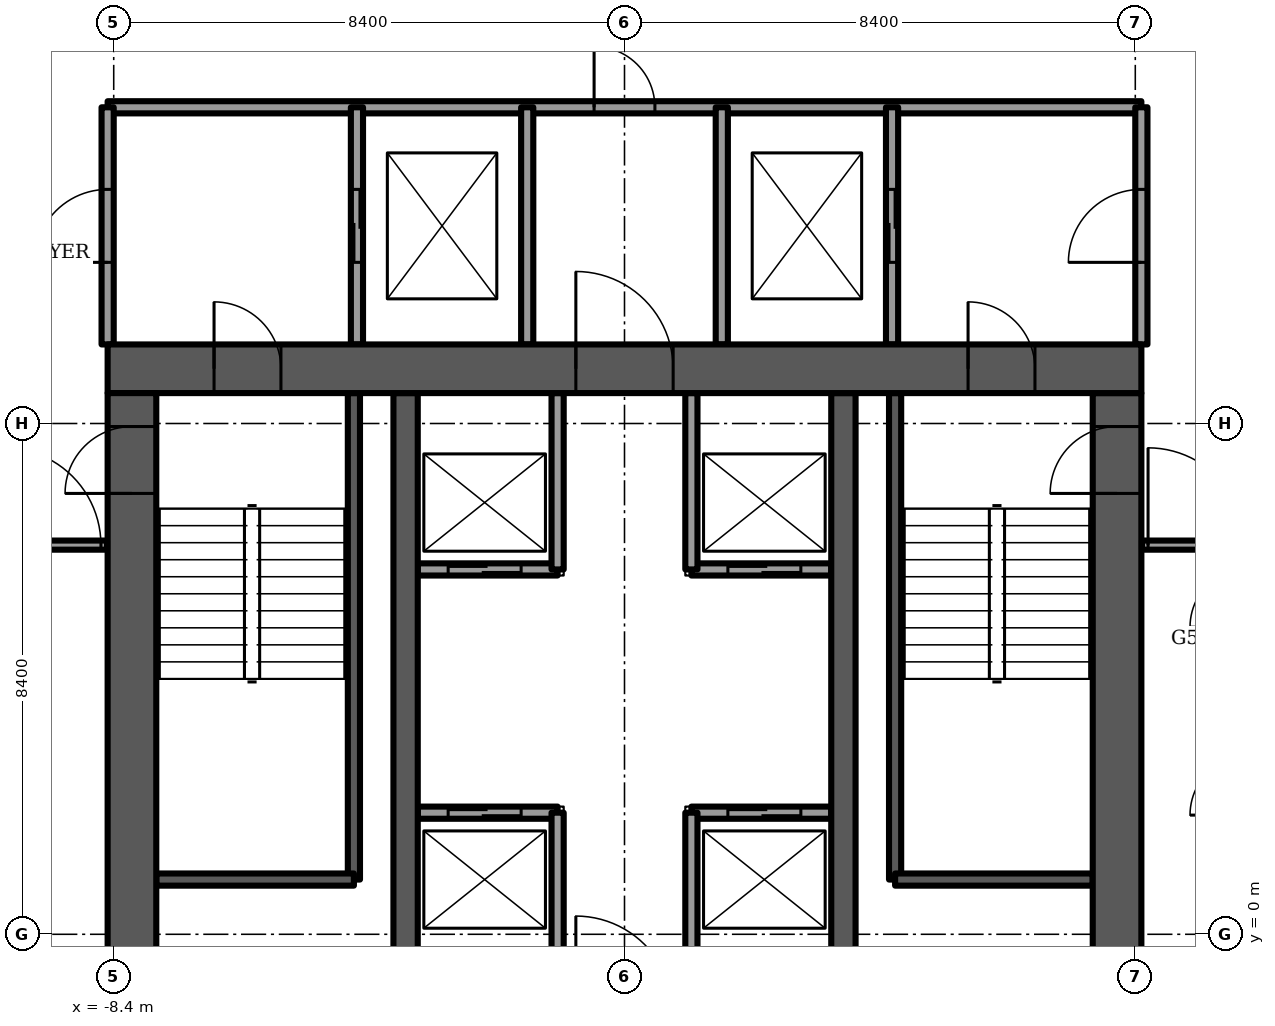
"""IFC4 building model, lengths in metres.
Left out: names, types, materials, properties, quantities, classifications, styles, units other than length and angle.
Written with IfcOpenShell. Run it as: python <this file> out.ifc"""

import sys

from ifc_helpers import new_model, si_unit, direction, frame, frame_2d, origin, place, context, subcontext, project, spatial, rectangle, extrude, element, fill, save


model = new_model("IFC4")
c1 = context("Model", 3, precision=1e-05, world=origin(), true_north=direction((0.0, 1.0)))
c2 = subcontext(c1, "Body", "Model", "MODEL_VIEW")
j1 = project(units=[si_unit("LENGTHUNIT", "METRE"), si_unit("PLANEANGLEUNIT", "RADIAN")], contexts=[c1])
p1 = place(None, origin())
s1 = spatial("IfcSite", under=j1, at=p1, CompositionType="ELEMENT")
p2 = place(p1, origin())
s2 = spatial("IfcBuilding", under=s1, at=p2, CompositionType="ELEMENT")
p3 = place(p2, frame((0.0, 0.0, 202.0)))
s3 = spatial("IfcBuildingStorey", under=s2, at=p3, CompositionType="ELEMENT", Elevation=202.0)
p4 = place(p3, frame((-8.5, 9.3, -0.3), z_axis=(0.0, 0.0, 1.0), x_axis=(1.0, 0.0, 0.0)))
e1 = element("IfcWall", 1, at=p4, inside=s3, PredefinedType="SHEAR", context=c2, shape_type="SweptSolid", body=[
    extrude(rectangle(XDim=17.0, YDim=0.8, at=frame_2d((8.5, 0.0))), origin(), (0.0, 0.0, 1.0), 3.75),
])
p5 = place(p4, frame((7.7, 0.0, 0.0)))
e2 = element("IfcOpeningElement", 2, at=p5, cuts=e1, PredefinedType="OPENING", context=c2, shape_type="SweptSolid", body=[
    extrude(rectangle(XDim=1.6, YDim=2.1, at=frame_2d((0.8, 1.05))), frame((0.0, 0.4, 0.0), z_axis=(0.0, -1.0, 0.0), x_axis=(1.0, 0.0, 0.0)), (0.0, 0.0, 1.0), 0.8),
])
p6 = place(p4, frame((1.75, 0.0, 0.0)))
e3 = element("IfcOpeningElement", 3, at=p6, cuts=e1, PredefinedType="OPENING", context=c2, shape_type="SweptSolid", body=[
    extrude(rectangle(XDim=1.1, YDim=2.1, at=frame_2d((0.55, 1.05))), frame((0.0, 0.4, 0.0), z_axis=(0.0, -1.0, 0.0), x_axis=(1.0, 0.0, 0.0)), (0.0, 0.0, 1.0), 0.8),
])
p7 = place(p4, frame((14.15, 0.0, 0.0)))
e4 = element("IfcOpeningElement", 4, at=p7, cuts=e1, PredefinedType="OPENING", context=c2, shape_type="SweptSolid", body=[
    extrude(rectangle(XDim=1.1, YDim=2.1, at=frame_2d((0.55, 1.05))), frame((0.0, 0.4, 0.0), z_axis=(0.0, -1.0, 0.0), x_axis=(1.0, 0.0, 0.0)), (0.0, 0.0, 1.0), 0.8),
])
p8 = place(p3, frame((-8.1, -0.9, -0.3), z_axis=(0.0, 0.0, 1.0), x_axis=(0.0, 1.0, 0.0)))
e5 = element("IfcWall", 5, at=p8, inside=s3, PredefinedType="SHEAR", context=c2, shape_type="SweptSolid", body=[
    extrude(rectangle(XDim=9.8, YDim=0.8, at=frame_2d((4.9, 0.0))), origin(), (0.0, 0.0, 1.0), 3.75),
])
p9 = place(p8, frame((8.15, 0.0, 0.0)))
e6 = element("IfcOpeningElement", 6, at=p9, cuts=e5, PredefinedType="OPENING", context=c2, shape_type="SweptSolid", body=[
    extrude(rectangle(XDim=1.1, YDim=2.1, at=frame_2d((0.55, 1.05))), frame((0.0, 0.4, 0.0), z_axis=(0.0, -1.0, 0.0), x_axis=(1.0, 0.0, 0.0)), (0.0, 0.0, 1.0), 0.8),
])
p10 = place(p3, frame((8.1, -0.9, -0.3), z_axis=(0.0, 0.0, 1.0), x_axis=(0.0, 1.0, 0.0)))
e7 = element("IfcWall", 7, at=p10, inside=s3, PredefinedType="SHEAR", context=c2, shape_type="SweptSolid", body=[
    extrude(rectangle(XDim=9.8, YDim=0.8, at=frame_2d((4.9, 0.0))), origin(), (0.0, 0.0, 1.0), 3.75),
])
p11 = place(p10, frame((8.15, 0.0, 0.0)))
e8 = element("IfcOpeningElement", 8, at=p11, cuts=e7, PredefinedType="OPENING", context=c2, shape_type="SweptSolid", body=[
    extrude(rectangle(XDim=1.1, YDim=2.1, at=frame_2d((0.55, 1.05))), frame((0.0, 0.4, 0.0), z_axis=(0.0, -1.0, 0.0), x_axis=(1.0, 0.0, 0.0)), (0.0, 0.0, 1.0), 0.8),
])
for number, where, z_axis, x_axis in (
    (9, (-3.6, -0.9, -0.3), (0.0, 0.0, 1.0), (0.0, 1.0, 0.0)),
    (10, (3.6, -0.9, -0.3), (0.0, 0.0, 1.0), (0.0, 1.0, 0.0)),
):
    element("IfcWall", number, at=place(p3, frame(where, z_axis=z_axis, x_axis=x_axis)), inside=s3, PredefinedType="SHEAR", context=c2, shape_type="SweptSolid", body=[
        extrude(rectangle(XDim=9.8, YDim=0.4, at=frame_2d((4.9, 0.0))), origin(), (0.0, 0.0, 1.0), 3.75),
    ])
for number, where, z_axis, x_axis in (
    (11, (-9.581, 17.88, 0.0), (0.0, 0.0, 1.0), (-0.5, -0.866, 0.0)),
    (12, (12.884, 12.159, 0.0), (0.0, 0.0, 1.0), (-0.5, 0.866, 0.0)),
):
    element("IfcWall", number, at=place(p3, frame(where, z_axis=z_axis, x_axis=x_axis)), inside=s3, PredefinedType="PARAPET", context=c2, shape_type="SweptSolid", body=[
        extrude(rectangle(XDim=6.606, YDim=0.9, at=frame_2d((3.303, 0.0))), origin(), (0.0, 0.0, 1.0), 1.1),
    ])
p12 = place(p3, frame((-3.4, 2.0, 0.0), z_axis=(0.0, 0.0, 1.0), x_axis=(1.0, 0.0, 0.0)))
e13 = element("IfcWall", 13, at=p12, inside=s3, PredefinedType="PARTITIONING", context=c2, shape_type="SweptSolid", body=[
    extrude(rectangle(XDim=2.3, YDim=0.2, at=frame_2d((1.15, 0.0))), origin(), (0.0, 0.0, 1.0), 3.45),
])
p13 = place(p12, frame((0.5, 0.0, 0.0)))
e14 = element("IfcOpeningElement", 14, at=p13, cuts=e13, PredefinedType="OPENING", context=c2, shape_type="SweptSolid", body=[
    extrude(rectangle(XDim=1.2, YDim=2.1, at=frame_2d((0.6, 1.05))), frame((0.0, 0.1, 0.0), z_axis=(0.0, -1.0, 0.0), x_axis=(1.0, 0.0, 0.0)), (0.0, 0.0, 1.0), 0.2),
])
p14 = place(p3, frame((-3.4, 6.0, 0.0), z_axis=(0.0, 0.0, 1.0), x_axis=(1.0, 0.0, 0.0)))
e15 = element("IfcWall", 15, at=p14, inside=s3, PredefinedType="PARTITIONING", context=c2, shape_type="SweptSolid", body=[
    extrude(rectangle(XDim=2.3, YDim=0.2, at=frame_2d((1.15, 0.0))), origin(), (0.0, 0.0, 1.0), 3.45),
])
p15 = place(p14, frame((0.5, 0.0, 0.0)))
e16 = element("IfcOpeningElement", 16, at=p15, cuts=e15, PredefinedType="OPENING", context=c2, shape_type="SweptSolid", body=[
    extrude(rectangle(XDim=1.2, YDim=2.1, at=frame_2d((0.6, 1.05))), frame((0.0, 0.1, 0.0), z_axis=(0.0, -1.0, 0.0), x_axis=(1.0, 0.0, 0.0)), (0.0, 0.0, 1.0), 0.2),
])
p16 = place(p3, frame((1.1, 2.0, 0.0), z_axis=(0.0, 0.0, 1.0), x_axis=(1.0, 0.0, 0.0)))
e17 = element("IfcWall", 17, at=p16, inside=s3, PredefinedType="PARTITIONING", context=c2, shape_type="SweptSolid", body=[
    extrude(rectangle(XDim=2.3, YDim=0.2, at=frame_2d((1.15, 0.0))), origin(), (0.0, 0.0, 1.0), 3.45),
])
p17 = place(p16, frame((0.6, 0.0, 0.0)))
e18 = element("IfcOpeningElement", 18, at=p17, cuts=e17, PredefinedType="OPENING", context=c2, shape_type="SweptSolid", body=[
    extrude(rectangle(XDim=1.2, YDim=2.1, at=frame_2d((0.6, 1.05))), frame((0.0, 0.1, 0.0), z_axis=(0.0, -1.0, 0.0), x_axis=(1.0, 0.0, 0.0)), (0.0, 0.0, 1.0), 0.2),
])
p18 = place(p3, frame((1.1, 6.0, 0.0), z_axis=(0.0, 0.0, 1.0), x_axis=(1.0, 0.0, 0.0)))
e19 = element("IfcWall", 19, at=p18, inside=s3, PredefinedType="PARTITIONING", context=c2, shape_type="SweptSolid", body=[
    extrude(rectangle(XDim=2.3, YDim=0.2, at=frame_2d((1.15, 0.0))), origin(), (0.0, 0.0, 1.0), 3.45),
])
p19 = place(p18, frame((0.6, 0.0, 0.0)))
e20 = element("IfcOpeningElement", 20, at=p19, cuts=e19, PredefinedType="OPENING", context=c2, shape_type="SweptSolid", body=[
    extrude(rectangle(XDim=1.2, YDim=2.1, at=frame_2d((0.6, 1.05))), frame((0.0, 0.1, 0.0), z_axis=(0.0, -1.0, 0.0), x_axis=(1.0, 0.0, 0.0)), (0.0, 0.0, 1.0), 0.2),
])
for number, where, z_axis, x_axis in (
    (21, (-1.1, -0.9, 0.0), (0.0, 0.0, 1.0), (0.0, 1.0, 0.0)),
    (22, (1.1, -0.9, 0.0), (0.0, 0.0, 1.0), (0.0, 1.0, 0.0)),
    (23, (-1.1, 6.0, 0.0), (0.0, 0.0, 1.0), (0.0, 1.0, 0.0)),
    (24, (1.1, 6.0, 0.0), (0.0, 0.0, 1.0), (0.0, 1.0, 0.0)),
):
    element("IfcWall", number, at=place(p3, frame(where, z_axis=z_axis, x_axis=x_axis)), inside=s3, PredefinedType="PARTITIONING", context=c2, shape_type="SweptSolid", body=[
        extrude(rectangle(XDim=2.9, YDim=0.2, at=frame_2d((1.45, 0.0))), origin(), (0.0, 0.0, 1.0), 3.45),
    ])
p20 = place(p3, frame((-4.45, 0.9, -0.3), z_axis=(0.0, 0.0, 1.0), x_axis=(0.0, 1.0, 0.0)))
e25 = element("IfcWall", 25, at=p20, inside=s3, PredefinedType="SOLIDWALL", context=c2, shape_type="SweptSolid", body=[
    extrude(rectangle(XDim=8.0, YDim=0.2, at=frame_2d((4.0, 0.0))), origin(), (0.0, 0.0, 1.0), 3.75),
])
p21 = place(p3, frame((-7.7, 0.9, -0.3), z_axis=(0.0, 0.0, 1.0), x_axis=(1.0, 0.0, 0.0)))
e26 = element("IfcWall", 26, at=p21, inside=s3, PredefinedType="SOLIDWALL", context=c2, shape_type="SweptSolid", body=[
    extrude(rectangle(XDim=3.25, YDim=0.2, at=frame_2d((1.625, 0.0))), origin(), (0.0, 0.0, 1.0), 3.75),
])
p22 = place(p3, frame((4.45, 0.9, -0.3), z_axis=(0.0, 0.0, 1.0), x_axis=(0.0, 1.0, 0.0)))
e27 = element("IfcWall", 27, at=p22, inside=s3, PredefinedType="SOLIDWALL", context=c2, shape_type="SweptSolid", body=[
    extrude(rectangle(XDim=8.0, YDim=0.2, at=frame_2d((4.0, 0.0))), origin(), (0.0, 0.0, 1.0), 3.75),
])
p23 = place(p3, frame((4.45, 0.9, -0.3), z_axis=(0.0, 0.0, 1.0), x_axis=(1.0, 0.0, 0.0)))
e28 = element("IfcWall", 28, at=p23, inside=s3, PredefinedType="SOLIDWALL", context=c2, shape_type="SweptSolid", body=[
    extrude(rectangle(XDim=3.25, YDim=0.2, at=frame_2d((1.625, 0.0))), origin(), (0.0, 0.0, 1.0), 3.75),
])
p24 = place(p3, frame((-8.5, 13.6, 0.0), z_axis=(0.0, 0.0, 1.0), x_axis=(1.0, 0.0, 0.0)))
e29 = element("IfcWall", 29, at=p24, inside=s3, PredefinedType="PARTITIONING", context=c2, shape_type="SweptSolid", body=[
    extrude(rectangle(XDim=17.0, YDim=0.2, at=frame_2d((8.5, 0.0))), origin(), (0.0, 0.0, 1.0), 3.45),
])
p25 = place(p24, frame((8.0, 0.0, 0.0)))
e30 = element("IfcOpeningElement", 30, at=p25, cuts=e29, PredefinedType="OPENING", context=c2, shape_type="SweptSolid", body=[
    extrude(rectangle(XDim=1.0, YDim=2.1, at=frame_2d((0.5, 1.05))), frame((0.0, 0.1, 0.0), z_axis=(0.0, -1.0, 0.0), x_axis=(1.0, 0.0, 0.0)), (0.0, 0.0, 1.0), 0.2),
])
p26 = place(p3, frame((-8.5, 9.7, 0.0), z_axis=(0.0, 0.0, 1.0), x_axis=(0.0, 1.0, 0.0)))
e31 = element("IfcWall", 31, at=p26, inside=s3, PredefinedType="PARTITIONING", context=c2, shape_type="SweptSolid", body=[
    extrude(rectangle(XDim=3.9, YDim=0.2, at=frame_2d((1.95, 0.0))), origin(), (0.0, 0.0, 1.0), 3.45),
])
p27 = place(p26, frame((1.35, 0.0, 0.0)))
e32 = element("IfcOpeningElement", 32, at=p27, cuts=e31, PredefinedType="OPENING", context=c2, shape_type="SweptSolid", body=[
    extrude(rectangle(XDim=1.2, YDim=2.1, at=frame_2d((0.6, 1.05))), frame((0.0, 0.1, 0.0), z_axis=(0.0, -1.0, 0.0), x_axis=(1.0, 0.0, 0.0)), (0.0, 0.0, 1.0), 0.2),
])
p28 = place(p3, frame((8.5, 9.7, 0.0), z_axis=(0.0, 0.0, 1.0), x_axis=(0.0, 1.0, 0.0)))
e33 = element("IfcWall", 33, at=p28, inside=s3, PredefinedType="PARTITIONING", context=c2, shape_type="SweptSolid", body=[
    extrude(rectangle(XDim=3.9, YDim=0.2, at=frame_2d((1.95, 0.0))), origin(), (0.0, 0.0, 1.0), 3.45),
])
p29 = place(p28, frame((1.35, 0.0, 0.0)))
e34 = element("IfcOpeningElement", 34, at=p29, cuts=e33, PredefinedType="OPENING", context=c2, shape_type="SweptSolid", body=[
    extrude(rectangle(XDim=1.2, YDim=2.1, at=frame_2d((0.6, 1.05))), frame((0.0, 0.1, 0.0), z_axis=(0.0, -1.0, 0.0), x_axis=(1.0, 0.0, 0.0)), (0.0, 0.0, 1.0), 0.2),
])
p30 = place(p3, frame((-4.4, 9.7, 0.0), z_axis=(0.0, 0.0, 1.0), x_axis=(0.0, 1.0, 0.0)))
e35 = element("IfcWall", 35, at=p30, inside=s3, PredefinedType="PARTITIONING", context=c2, shape_type="SweptSolid", body=[
    extrude(rectangle(XDim=3.9, YDim=0.2, at=frame_2d((1.95, 0.0))), origin(), (0.0, 0.0, 1.0), 3.45),
])
p31 = place(p30, frame((1.35, 0.0, 0.0)))
e36 = element("IfcOpeningElement", 36, at=p31, cuts=e35, PredefinedType="OPENING", context=c2, shape_type="SweptSolid", body=[
    extrude(rectangle(XDim=1.2, YDim=2.1, at=frame_2d((0.6, 1.05))), frame((0.0, 0.1, 0.0), z_axis=(0.0, -1.0, 0.0), x_axis=(1.0, 0.0, 0.0)), (0.0, 0.0, 1.0), 0.2),
])
p32 = place(p3, frame((4.4, 9.7, 0.0), z_axis=(0.0, 0.0, 1.0), x_axis=(0.0, 1.0, 0.0)))
e37 = element("IfcWall", 37, at=p32, inside=s3, PredefinedType="PARTITIONING", context=c2, shape_type="SweptSolid", body=[
    extrude(rectangle(XDim=3.9, YDim=0.2, at=frame_2d((1.95, 0.0))), origin(), (0.0, 0.0, 1.0), 3.45),
])
p33 = place(p32, frame((1.35, 0.0, 0.0)))
e38 = element("IfcOpeningElement", 38, at=p33, cuts=e37, PredefinedType="OPENING", context=c2, shape_type="SweptSolid", body=[
    extrude(rectangle(XDim=1.2, YDim=2.1, at=frame_2d((0.6, 1.05))), frame((0.0, 0.1, 0.0), z_axis=(0.0, -1.0, 0.0), x_axis=(1.0, 0.0, 0.0)), (0.0, 0.0, 1.0), 0.2),
])
for number, where, z_axis, x_axis in (
    (39, (-1.6, 9.7, 0.0), (0.0, 0.0, 1.0), (0.0, 1.0, 0.0)),
    (40, (1.6, 9.7, 0.0), (0.0, 0.0, 1.0), (0.0, 1.0, 0.0)),
):
    element("IfcWall", number, at=place(p3, frame(where, z_axis=z_axis, x_axis=x_axis)), inside=s3, PredefinedType="PARTITIONING", context=c2, shape_type="SweptSolid", body=[
        extrude(rectangle(XDim=3.9, YDim=0.2, at=frame_2d((1.95, 0.0))), origin(), (0.0, 0.0, 1.0), 3.45),
    ])
p34 = place(p3, frame((-11.93, 6.4, 0.0), z_axis=(0.0, 0.0, 1.0), x_axis=(1.0, 0.0, 0.0)))
e41 = element("IfcWall", 41, at=p34, inside=s3, PredefinedType="PARTITIONING", context=c2, shape_type="SweptSolid", body=[
    extrude(rectangle(XDim=3.42, YDim=0.15, at=frame_2d((1.71, 0.0))), origin(), (0.0, 0.0, 1.0), 3.45),
])
p35 = place(p34, frame((1.72, 0.0, 0.0)))
e42 = element("IfcOpeningElement", 42, at=p35, cuts=e41, PredefinedType="OPENING", context=c2, shape_type="SweptSolid", body=[
    extrude(rectangle(XDim=1.6, YDim=2.1, at=frame_2d((0.8, 1.05))), frame((0.0, 0.075, 0.0), z_axis=(0.0, -1.0, 0.0), x_axis=(1.0, 0.0, 0.0)), (0.0, 0.0, 1.0), 0.15),
])
p36 = place(p3, frame((8.51, 6.4, 0.0), z_axis=(0.0, 0.0, 1.0), x_axis=(1.0, 0.0, 0.0)))
e43 = element("IfcWall", 43, at=p36, inside=s3, PredefinedType="PARTITIONING", context=c2, shape_type="SweptSolid", body=[
    extrude(rectangle(XDim=3.42, YDim=0.15, at=frame_2d((1.71, 0.0))), origin(), (0.0, 0.0, 1.0), 3.45),
])
p37 = place(p36, frame((0.1, 0.0, 0.0)))
e44 = element("IfcOpeningElement", 44, at=p37, cuts=e43, PredefinedType="OPENING", context=c2, shape_type="SweptSolid", body=[
    extrude(rectangle(XDim=1.6, YDim=2.1, at=frame_2d((0.8, 1.05))), frame((0.0, 0.075, 0.0), z_axis=(0.0, -1.0, 0.0), x_axis=(1.0, 0.0, 0.0)), (0.0, 0.0, 1.0), 0.15),
])
p38 = place(p13, origin())
e45 = element("IfcDoor", 45, at=p38, inside=s3, OperationType="SLIDING_TO_LEFT", PredefinedType="DOOR", context=c2, shape_type="SweptSolid", body=[
    extrude(rectangle(XDim=1.2, YDim=2.1, at=frame_2d((0.6, 1.05))), frame((0.0, 0.025, 0.0), z_axis=(0.0, -1.0, 0.0), x_axis=(1.0, 0.0, 0.0)), (0.0, 0.0, 1.0), 0.05),
])
fill(e14, e45)
p39 = place(p17, origin())
e46 = element("IfcDoor", 46, at=p39, inside=s3, OperationType="SLIDING_TO_LEFT", PredefinedType="DOOR", context=c2, shape_type="SweptSolid", body=[
    extrude(rectangle(XDim=1.2, YDim=2.1, at=frame_2d((0.6, 1.05))), frame((0.0, 0.025, 0.0), z_axis=(0.0, -1.0, 0.0), x_axis=(1.0, 0.0, 0.0)), (0.0, 0.0, 1.0), 0.05),
])
fill(e18, e46)
p40 = place(p15, origin())
e47 = element("IfcDoor", 47, at=p40, inside=s3, OperationType="SLIDING_TO_LEFT", PredefinedType="DOOR", context=c2, shape_type="SweptSolid", body=[
    extrude(rectangle(XDim=1.2, YDim=2.1, at=frame_2d((0.6, 1.05))), frame((0.0, 0.025, 0.0), z_axis=(0.0, -1.0, 0.0), x_axis=(1.0, 0.0, 0.0)), (0.0, 0.0, 1.0), 0.05),
])
fill(e16, e47)
p41 = place(p19, origin())
e48 = element("IfcDoor", 48, at=p41, inside=s3, OperationType="SLIDING_TO_LEFT", PredefinedType="DOOR", context=c2, shape_type="SweptSolid", body=[
    extrude(rectangle(XDim=1.2, YDim=2.1, at=frame_2d((0.6, 1.05))), frame((0.0, 0.025, 0.0), z_axis=(0.0, -1.0, 0.0), x_axis=(1.0, 0.0, 0.0)), (0.0, 0.0, 1.0), 0.05),
])
fill(e20, e48)
p42 = place(p5, origin())
e49 = element("IfcDoor", 49, at=p42, inside=s3, OperationType="DOUBLE_DOOR_SINGLE_SWING", PredefinedType="DOOR", context=c2, shape_type="SweptSolid", body=[
    extrude(rectangle(XDim=1.6, YDim=2.1, at=frame_2d((0.8, 1.05))), frame((0.0, 0.025, 0.0), z_axis=(0.0, -1.0, 0.0), x_axis=(1.0, 0.0, 0.0)), (0.0, 0.0, 1.0), 0.05),
])
fill(e2, e49)
p43 = place(p6, origin())
e50 = element("IfcDoor", 50, at=p43, inside=s3, OperationType="SINGLE_SWING_LEFT", PredefinedType="DOOR", context=c2, shape_type="SweptSolid", body=[
    extrude(rectangle(XDim=1.1, YDim=2.1, at=frame_2d((0.55, 1.05))), frame((0.0, 0.025, 0.0), z_axis=(0.0, -1.0, 0.0), x_axis=(1.0, 0.0, 0.0)), (0.0, 0.0, 1.0), 0.05),
])
fill(e3, e50)
p44 = place(p9, origin())
e51 = element("IfcDoor", 51, at=p44, inside=s3, OperationType="SINGLE_SWING_RIGHT", PredefinedType="DOOR", context=c2, shape_type="SweptSolid", body=[
    extrude(rectangle(XDim=1.1, YDim=2.1, at=frame_2d((0.55, 1.05))), frame((0.0, 0.025, 0.0), z_axis=(0.0, -1.0, 0.0), x_axis=(1.0, 0.0, 0.0)), (0.0, 0.0, 1.0), 0.05),
])
fill(e6, e51)
p45 = place(p7, origin())
e52 = element("IfcDoor", 52, at=p45, inside=s3, OperationType="SINGLE_SWING_RIGHT", PredefinedType="DOOR", context=c2, shape_type="SweptSolid", body=[
    extrude(rectangle(XDim=1.1, YDim=2.1, at=frame_2d((0.55, 1.05))), frame((0.0, 0.025, 0.0), z_axis=(0.0, -1.0, 0.0), x_axis=(1.0, 0.0, 0.0)), (0.0, 0.0, 1.0), 0.05),
])
fill(e4, e52)
p46 = place(p11, origin())
e53 = element("IfcDoor", 53, at=p46, inside=s3, OperationType="SINGLE_SWING_LEFT", PredefinedType="DOOR", context=c2, shape_type="SweptSolid", body=[
    extrude(rectangle(XDim=1.1, YDim=2.1, at=frame_2d((0.55, 1.05))), frame((0.0, 0.025, 0.0), z_axis=(0.0, -1.0, 0.0), x_axis=(1.0, 0.0, 0.0)), (0.0, 0.0, 1.0), 0.05),
])
fill(e8, e53)
p47 = place(p31, origin())
e54 = element("IfcDoor", 54, at=p47, inside=s3, OperationType="SLIDING_TO_LEFT", PredefinedType="DOOR", context=c2, shape_type="SweptSolid", body=[
    extrude(rectangle(XDim=1.2, YDim=2.1, at=frame_2d((0.6, 1.05))), frame((0.0, 0.025, 0.0), z_axis=(0.0, -1.0, 0.0), x_axis=(1.0, 0.0, 0.0)), (0.0, 0.0, 1.0), 0.05),
])
fill(e36, e54)
p48 = place(p27, origin())
e55 = element("IfcDoor", 55, at=p48, inside=s3, OperationType="SINGLE_SWING_LEFT", PredefinedType="DOOR", context=c2, shape_type="SweptSolid", body=[
    extrude(rectangle(XDim=1.2, YDim=2.1, at=frame_2d((0.6, 1.05))), frame((0.0, 0.025, 0.0), z_axis=(0.0, -1.0, 0.0), x_axis=(1.0, 0.0, 0.0)), (0.0, 0.0, 1.0), 0.05),
])
fill(e32, e55)
p49 = place(p33, origin())
e56 = element("IfcDoor", 56, at=p49, inside=s3, OperationType="SLIDING_TO_LEFT", PredefinedType="DOOR", context=c2, shape_type="SweptSolid", body=[
    extrude(rectangle(XDim=1.2, YDim=2.1, at=frame_2d((0.6, 1.05))), frame((0.0, 0.025, 0.0), z_axis=(0.0, -1.0, 0.0), x_axis=(1.0, 0.0, 0.0)), (0.0, 0.0, 1.0), 0.05),
])
fill(e38, e56)
p50 = place(p29, origin())
e57 = element("IfcDoor", 57, at=p50, inside=s3, OperationType="SINGLE_SWING_LEFT", PredefinedType="DOOR", context=c2, shape_type="SweptSolid", body=[
    extrude(rectangle(XDim=1.2, YDim=2.1, at=frame_2d((0.6, 1.05))), frame((0.0, 0.025, 0.0), z_axis=(0.0, -1.0, 0.0), x_axis=(1.0, 0.0, 0.0)), (0.0, 0.0, 1.0), 0.05),
])
fill(e34, e57)
p51 = place(p25, origin())
e58 = element("IfcDoor", 58, at=p51, inside=s3, OperationType="SINGLE_SWING_LEFT", PredefinedType="DOOR", context=c2, shape_type="SweptSolid", body=[
    extrude(rectangle(XDim=1.0, YDim=2.1, at=frame_2d((0.5, 1.05))), frame((0.0, 0.025, 0.0), z_axis=(0.0, -1.0, 0.0), x_axis=(1.0, 0.0, 0.0)), (0.0, 0.0, 1.0), 0.05),
])
fill(e30, e58)
p52 = place(p35, origin())
e59 = element("IfcDoor", 59, at=p52, inside=s3, OperationType="DOUBLE_DOOR_SINGLE_SWING", PredefinedType="DOOR", context=c2, shape_type="SweptSolid", body=[
    extrude(rectangle(XDim=1.6, YDim=2.1, at=frame_2d((0.8, 1.05))), frame((0.0, 0.025, 0.0), z_axis=(0.0, -1.0, 0.0), x_axis=(1.0, 0.0, 0.0)), (0.0, 0.0, 1.0), 0.05),
])
fill(e42, e59)
p53 = place(p37, origin())
e60 = element("IfcDoor", 60, at=p53, inside=s3, OperationType="DOUBLE_DOOR_SINGLE_SWING", PredefinedType="DOOR", context=c2, shape_type="SweptSolid", body=[
    extrude(rectangle(XDim=1.6, YDim=2.1, at=frame_2d((0.8, 1.05))), frame((0.0, 0.025, 0.0), z_axis=(0.0, -1.0, 0.0), x_axis=(1.0, 0.0, 0.0)), (0.0, 0.0, 1.0), 0.05),
])
fill(e44, e60)
save(model, sys.argv[1])
